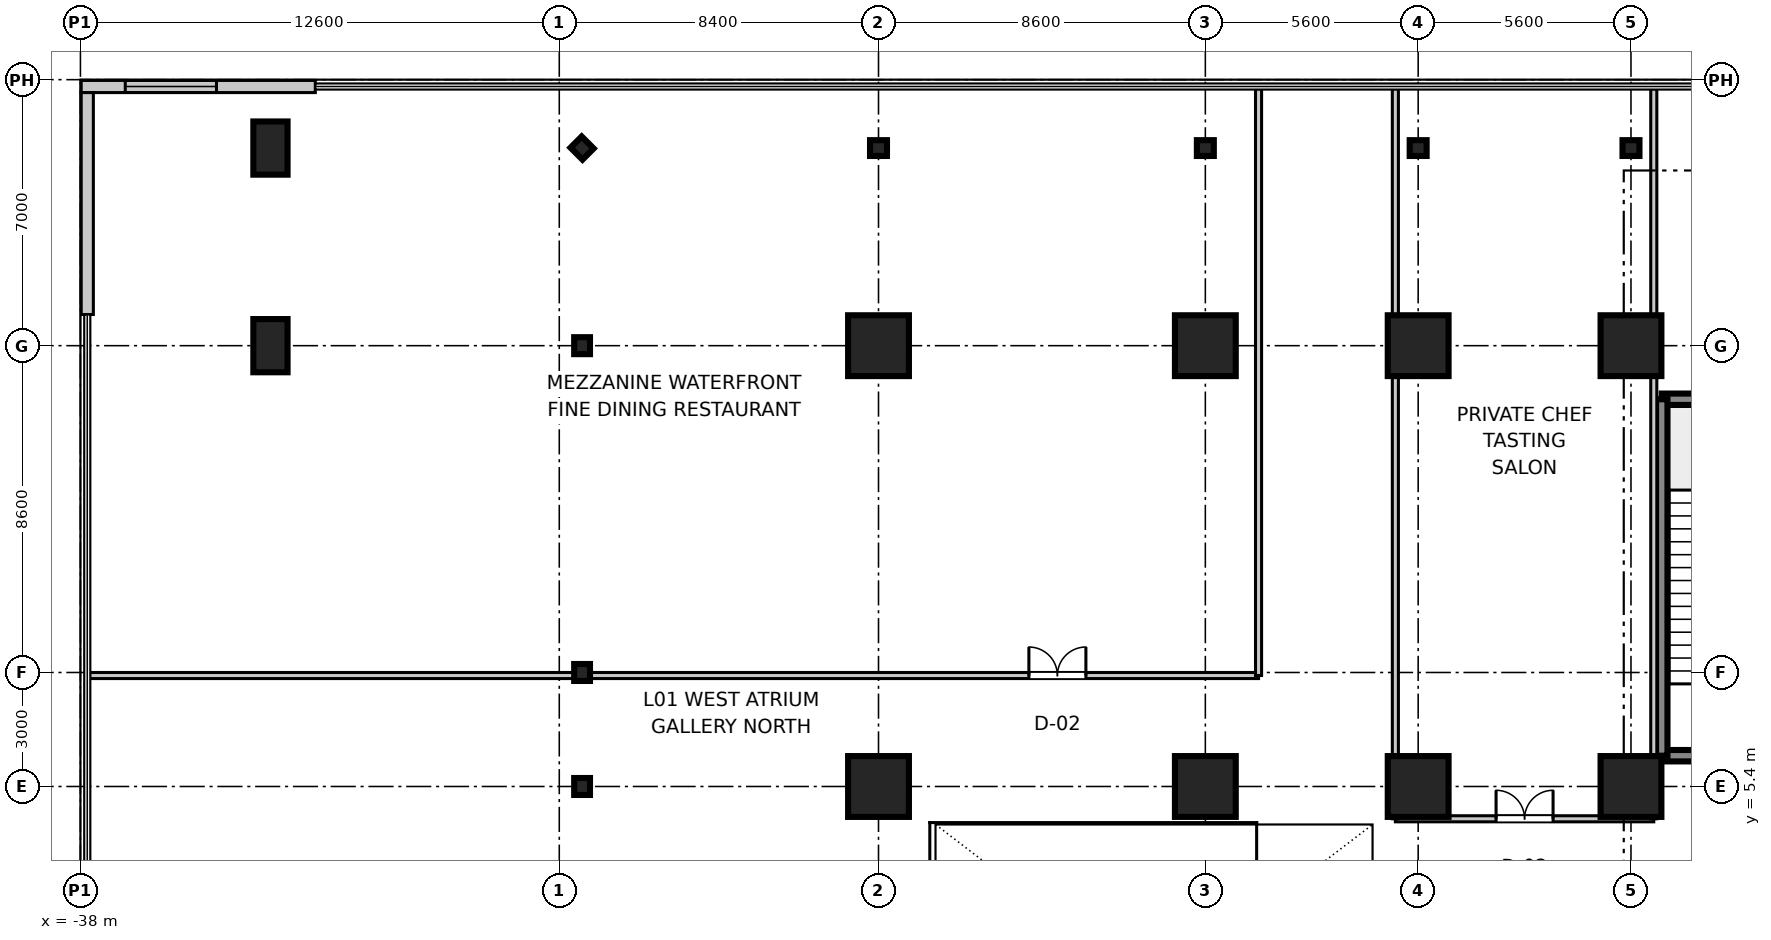
"""IFC4 building model, lengths in metres.
Left out: names, types, materials, properties, quantities, classifications, styles, units other than length and angle.
Written with IfcOpenShell. Run it as: python <this file> out.ifc"""

import sys

from ifc_helpers import new_model, si_unit, direction, frame, frame_2d, origin, origin_2d, place, context, subcontext, project, spatial, rectangle, i_section, extrude, source, transform, mapped, element, fill, save


model = new_model("IFC4")
c1 = context("Model", 3, precision=1e-05, world=origin(), true_north=direction((0.0, 1.0)))
c2 = subcontext(c1, "Body", "Model", "MODEL_VIEW")
j1 = project(units=[si_unit("LENGTHUNIT", "METRE"), si_unit("PLANEANGLEUNIT", "RADIAN")], contexts=[c1])
p1 = place(None, origin())
s1 = spatial("IfcSite", under=j1, at=p1, CompositionType="ELEMENT")
p2 = place(p1, origin())
s2 = spatial("IfcBuilding", under=s1, at=p2, CompositionType="ELEMENT")
p3 = place(p2, frame((0.0, 0.0, 5.4)))
s3 = spatial("IfcBuildingStorey", under=s2, at=p3, CompositionType="ELEMENT", Elevation=5.4)
m1 = source(origin(), c2, "Body", "SweptSolid", [
    extrude(rectangle(XDim=1.6, YDim=1.6, at=origin_2d()), origin(), (0.0, 0.0, 1.0), 5.355),
])
for number, where, z_axis, x_axis in (
    (1, (-17.0, 5.4, 0.0), (0.0, 0.0, 1.0), (1.0, 0.0, 0.0)),
    (2, (-17.0, 17.0, 0.0), (0.0, 0.0, 1.0), (1.0, 0.0, 0.0)),
    (3, (-8.4, 5.4, 0.0), (0.0, 0.0, 1.0), (1.0, 0.0, 0.0)),
    (4, (-8.4, 17.0, 0.0), (0.0, 0.0, 1.0), (1.0, 0.0, 0.0)),
    (5, (-2.8, 5.4, 0.0), (0.0, 0.0, 1.0), (1.0, 0.0, 0.0)),
    (6, (-2.8, 17.0, 0.0), (0.0, 0.0, 1.0), (1.0, 0.0, 0.0)),
    (7, (2.8, 5.4, 0.0), (0.0, 0.0, 1.0), (1.0, 0.0, 0.0)),
    (8, (2.8, 17.0, 0.0), (0.0, 0.0, 1.0), (1.0, 0.0, 0.0)),
):
    element("IfcColumn", number, at=place(p3, frame(where, z_axis=z_axis, x_axis=x_axis)), inside=s3, PredefinedType="COLUMN", context=c2, shape_type="MappedRepresentation", body=[
        mapped(m1, transform((0.0, 0.0, 0.0), scale=1.0)),
    ])
m2 = source(origin(), c2, "Body", "SweptSolid", [
    extrude(rectangle(XDim=0.9, YDim=1.4, at=origin_2d()), origin(), (0.0, 0.0, 1.0), 5.355),
])
for number, where, z_axis, x_axis in (
    (9, (-33.0, 17.0, 0.0), (0.0, 0.0, 1.0), (1.0, 0.0, 0.0)),
    (10, (-33.0, 22.2, 0.0), (0.0, 0.0, 1.0), (1.0, 0.0, 0.0)),
):
    element("IfcColumn", number, at=place(p3, frame(where, z_axis=z_axis, x_axis=x_axis)), inside=s3, PredefinedType="PILASTER", context=c2, shape_type="MappedRepresentation", body=[
        mapped(m2, transform((0.0, 0.0, 0.0), scale=1.0)),
    ])
m3 = source(origin(), c2, "Body", "SweptSolid", [
    extrude(i_section(OverallWidth=0.416, OverallDepth=0.446, WebThickness=0.025, FlangeThickness=0.04, at=origin_2d()), origin(), (0.0, 0.0, 1.0), 5.355),
])
for number, where, z_axis, x_axis in (
    (11, (-24.8, 5.4, 0.0), (0.0, 0.0, 1.0), (1.0, 0.0, 0.0)),
    (12, (-24.8, 8.4, 0.0), (0.0, 0.0, 1.0), (1.0, 0.0, 0.0)),
    (13, (-24.8, 17.0, 0.0), (0.0, 0.0, 1.0), (1.0, 0.0, 0.0)),
    (14, (-17.0, 22.2, 0.0), (0.0, 0.0, 1.0), (0.0, 1.0, 0.0)),
    (15, (-8.4, 22.2, 0.0), (0.0, 0.0, 1.0), (0.0, 1.0, 0.0)),
    (16, (-2.8, 22.2, 0.0), (0.0, 0.0, 1.0), (0.0, 1.0, 0.0)),
    (17, (2.8, 22.2, 0.0), (0.0, 0.0, 1.0), (0.0, 1.0, 0.0)),
    (18, (-24.8, 22.2, 0.0), (0.0, 0.0, 1.0), (0.707, 0.707, 0.0)),
):
    element("IfcColumn", number, at=place(p3, frame(where, z_axis=z_axis, x_axis=x_axis)), inside=s3, PredefinedType="COLUMN", context=c2, shape_type="MappedRepresentation", body=[
        mapped(m3, transform((0.0, 0.0, 0.0), scale=1.0)),
    ])
m4 = source(origin(), c2, "Body", "SweptSolid", [
    extrude(rectangle(XDim=3.98, YDim=0.3, at=frame_2d((1.99, 0.0))), origin(), (0.0, 0.0, 1.0), 5.08),
])
for number, where, z_axis, x_axis in (
    (19, (3.61, 6.21, 0.0), (0.0, 0.0, 1.0), (1.0, 0.0, 0.0)),
    (20, (3.61, 15.59, 0.0), (0.0, 0.0, 1.0), (1.0, 0.0, 0.0)),
):
    element("IfcWall", number, at=place(p3, frame(where, z_axis=z_axis, x_axis=x_axis)), inside=s3, PredefinedType="SHEAR", context=c2, shape_type="MappedRepresentation", body=[
        mapped(m4, transform((0.0, 0.0, 0.0), scale=1.0)),
    ])
m5 = source(origin(), c2, "Body", "SweptSolid", [
    extrude(rectangle(XDim=9.38, YDim=0.3, at=frame_2d((4.69, 0.0))), origin(), (0.0, 0.0, 1.0), 5.08),
])
p4 = place(p3, frame((3.61, 6.21, 0.0), z_axis=(0.0, 0.0, 1.0), x_axis=(0.0, 1.0, 0.0)))
e21 = element("IfcWall", 21, at=p4, inside=s3, PredefinedType="SHEAR", context=c2, shape_type="MappedRepresentation", body=[
    mapped(m5, transform((0.0, 0.0, 0.0), scale=1.0)),
])
m6 = source(origin(), c2, "Body", "SweptSolid", [
    extrude(rectangle(XDim=6.16, YDim=0.32, at=frame_2d((3.08, 0.0))), origin(), (0.0, 0.0, 1.0), 5.08),
])
p5 = place(p3, frame((-37.98, 23.82, 0.0), z_axis=(0.0, 0.0, 1.0), x_axis=(1.0, 0.0, 0.0)))
e22 = element("IfcWall", 22, at=p5, inside=s3, PredefinedType="STANDARD", context=c2, shape_type="MappedRepresentation", body=[
    mapped(m6, transform((0.0, 0.0, 0.0), scale=1.0)),
])
p6 = place(p5, frame((1.16, 0.0, 0.9)))
e23 = element("IfcOpeningElement", 23, at=p6, cuts=e22, PredefinedType="OPENING", context=c2, shape_type="SweptSolid", body=[
    extrude(rectangle(XDim=2.4, YDim=2.2, at=frame_2d((1.2, 1.1))), frame((0.0, 0.17, 0.0), z_axis=(0.0, -1.0, 0.0), x_axis=(1.0, 0.0, 0.0)), (0.0, 0.0, 1.0), 0.34),
])
m7 = source(origin(), c2, "Body", "SweptSolid", [
    extrude(rectangle(XDim=5.84, YDim=0.32, at=frame_2d((2.92, 0.0))), origin(), (0.0, 0.0, 1.0), 5.08),
])
p7 = place(p3, frame((-37.82, 17.82, 0.0), z_axis=(0.0, 0.0, 1.0), x_axis=(0.0, 1.0, 0.0)))
e24 = element("IfcWall", 24, at=p7, inside=s3, PredefinedType="STANDARD", context=c2, shape_type="MappedRepresentation", body=[
    mapped(m7, transform((0.0, 0.0, 0.0), scale=1.0)),
])
m8 = source(origin(), c2, "Body", "SweptSolid", [
    extrude(rectangle(XDim=30.76, YDim=0.16, at=frame_2d((15.38, 0.0))), origin(), (0.0, 0.0, 1.0), 3.4),
])
p8 = place(p3, frame((-37.76, 8.32, 0.0), z_axis=(0.0, 0.0, 1.0), x_axis=(1.0, 0.0, 0.0)))
e25 = element("IfcWall", 25, at=p8, inside=s3, PredefinedType="PARTITIONING", context=c2, shape_type="MappedRepresentation", body=[
    mapped(m8, transform((0.0, 0.0, 0.0), scale=1.0)),
])
p9 = place(p8, frame((24.717, 0.0, 0.0)))
e26 = element("IfcOpeningElement", 26, at=p9, cuts=e25, PredefinedType="OPENING", context=c2, shape_type="SweptSolid", body=[
    extrude(rectangle(XDim=1.5, YDim=2.15, at=frame_2d((0.75, 1.075))), frame((0.0, 0.09, 0.0), z_axis=(0.0, -1.0, 0.0), x_axis=(1.0, 0.0, 0.0)), (0.0, 0.0, 1.0), 0.18),
])
m9 = source(origin(), c2, "Body", "SweptSolid", [
    extrude(rectangle(XDim=15.44, YDim=0.16, at=frame_2d((7.72, 0.0))), origin(), (0.0, 0.0, 1.0), 3.4),
])
p10 = place(p3, frame((-7.0, 8.32, 0.0), z_axis=(0.0, 0.0, 1.0), x_axis=(0.0, 1.0, 0.0)))
e27 = element("IfcWall", 27, at=p10, inside=s3, PredefinedType="PARTITIONING", context=c2, shape_type="MappedRepresentation", body=[
    mapped(m9, transform((0.0, 0.0, 0.0), scale=1.0)),
])
m10 = source(origin(), c2, "Body", "SweptSolid", [
    extrude(rectangle(XDim=6.8, YDim=0.16, at=frame_2d((3.4, 0.0))), origin(), (0.0, 0.0, 1.0), 3.4),
])
p11 = place(p3, frame((-3.4, 4.55, 0.0), z_axis=(0.0, 0.0, 1.0), x_axis=(1.0, 0.0, 0.0)))
e28 = element("IfcWall", 28, at=p11, inside=s3, PredefinedType="PARTITIONING", context=c2, shape_type="MappedRepresentation", body=[
    mapped(m10, transform((0.0, 0.0, 0.0), scale=1.0)),
])
p12 = place(p11, frame((2.65, 0.0, 0.0)))
e29 = element("IfcOpeningElement", 29, at=p12, cuts=e28, PredefinedType="OPENING", context=c2, shape_type="SweptSolid", body=[
    extrude(rectangle(XDim=1.5, YDim=2.15, at=frame_2d((0.75, 1.075))), frame((0.0, 0.09, 0.0), z_axis=(0.0, -1.0, 0.0), x_axis=(1.0, 0.0, 0.0)), (0.0, 0.0, 1.0), 0.18),
])
m11 = source(origin(), c2, "Body", "SweptSolid", [
    extrude(rectangle(XDim=19.21, YDim=0.16, at=frame_2d((9.605, 0.0))), origin(), (0.0, 0.0, 1.0), 3.4),
])
for number, where, z_axis, x_axis in (
    (30, (-3.4, 4.55, 0.0), (0.0, 0.0, 1.0), (0.0, 1.0, 0.0)),
    (31, (3.4, 4.55, 0.0), (0.0, 0.0, 1.0), (0.0, 1.0, 0.0)),
):
    element("IfcWall", number, at=place(p3, frame(where, z_axis=z_axis, x_axis=x_axis)), inside=s3, PredefinedType="PARTITIONING", context=c2, shape_type="MappedRepresentation", body=[
        mapped(m11, transform((0.0, 0.0, 0.0), scale=1.0)),
    ])
m12 = source(origin(), c2, "Body", "SweptSolid", [
    extrude(rectangle(XDim=2.4, YDim=2.2, at=frame_2d((1.2, 1.1))), frame((0.0, 0.03, 0.0), z_axis=(0.0, -1.0, 0.0), x_axis=(1.0, 0.0, 0.0)), (0.0, 0.0, 1.0), 0.06),
])
p13 = place(p6, origin())
e32 = element("IfcWindow", 32, at=p13, inside=s3, PartitioningType="SINGLE_PANEL", PredefinedType="WINDOW", context=c2, shape_type="MappedRepresentation", body=[
    mapped(m12, transform((0.0, 0.0, 0.0), scale=1.0)),
])
fill(e23, e32)
m13 = source(origin(), c2, "Body", "SweptSolid", [
    extrude(rectangle(XDim=1.5, YDim=2.15, at=frame_2d((0.75, 1.075))), frame((0.0, 0.025, 0.0), z_axis=(0.0, -1.0, 0.0), x_axis=(1.0, 0.0, 0.0)), (0.0, 0.0, 1.0), 0.05),
])
p14 = place(p9, origin())
e33 = element("IfcDoor", 33, at=p14, inside=s3, OperationType="DOUBLE_DOOR_SINGLE_SWING", PredefinedType="DOOR", context=c2, shape_type="MappedRepresentation", body=[
    mapped(m13, transform((0.0, 0.0, 0.0), scale=1.0)),
])
fill(e26, e33)
p15 = place(p12, origin())
e34 = element("IfcDoor", 34, at=p15, inside=s3, OperationType="DOUBLE_DOOR_SINGLE_SWING", PredefinedType="DOOR", context=c2, shape_type="MappedRepresentation", body=[
    mapped(m13, transform((0.0, 0.0, 0.0), scale=1.0)),
])
fill(e29, e34)
save(model, sys.argv[1])
